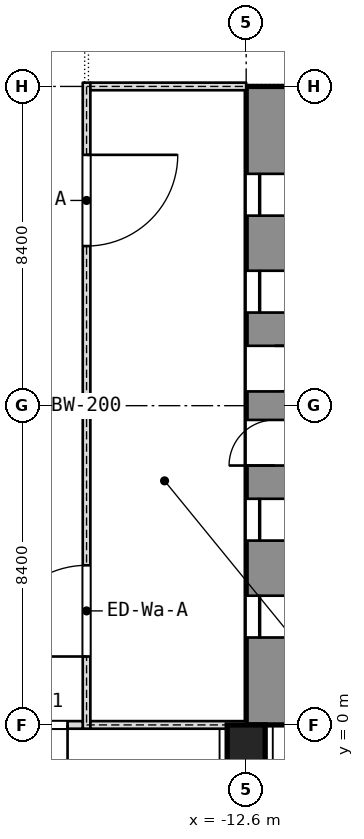
"""IFC4 building model, lengths in metres.
Left out: names, types, materials, properties, quantities, classifications, styles, units other than length and angle.
Written with IfcOpenShell. Run it as: python <this file> out.ifc"""

import sys

from ifc_helpers import new_model, si_unit, direction, frame, frame_2d, origin, origin_2d, place, context, subcontext, project, spatial, rectangle, extrude, element, fill, save


model = new_model("IFC4")
c1 = context("Model", 3, precision=1e-05, world=origin(), true_north=direction((0.0, 1.0)))
c2 = subcontext(c1, "Body", "Model", "MODEL_VIEW")
j1 = project(units=[si_unit("LENGTHUNIT", "METRE"), si_unit("PLANEANGLEUNIT", "RADIAN")], contexts=[c1])
p1 = place(None, origin())
s1 = spatial("IfcSite", under=j1, at=p1, CompositionType="ELEMENT")
p2 = place(p1, origin())
s2 = spatial("IfcBuilding", under=s1, at=p2, CompositionType="ELEMENT")
p3 = place(p2, frame((0.0, 0.0, 31.0)))
s3 = spatial("IfcBuildingStorey", under=s2, at=p3, CompositionType="ELEMENT", Elevation=31.0)
p4 = place(p3, frame((-11.85, 0.0, 0.0), z_axis=(0.0, 0.0, 1.0), x_axis=(0.0, 1.0, 0.0)))
e1 = element("IfcWall", 1, at=p4, inside=s3, PredefinedType="SHEAR", context=c2, shape_type="SweptSolid", body=[
    extrude(rectangle(XDim=16.8, YDim=1.5, at=frame_2d((8.4, 0.0))), origin(), (0.0, 0.0, 1.0), 5.5),
])
p5 = place(p4, frame((2.3, 0.0, 0.0)))
e2 = element("IfcOpeningElement", 2, at=p5, cuts=e1, PredefinedType="OPENING", context=c2, shape_type="SweptSolid", body=[
    extrude(rectangle(XDim=1.1, YDim=2.1, at=frame_2d((0.55, 1.05))), frame((0.0, 0.75, 0.0), z_axis=(0.0, -1.0, 0.0), x_axis=(1.0, 0.0, 0.0)), (0.0, 0.0, 1.0), 1.5),
])
p6 = place(p4, frame((4.85, 0.0, 0.0)))
e3 = element("IfcOpeningElement", 3, at=p6, cuts=e1, PredefinedType="OPENING", context=c2, shape_type="SweptSolid", body=[
    extrude(rectangle(XDim=1.1, YDim=2.1, at=frame_2d((0.55, 1.05))), frame((0.0, 0.75, 0.0), z_axis=(0.0, -1.0, 0.0), x_axis=(1.0, 0.0, 0.0)), (0.0, 0.0, 1.0), 1.5),
])
p7 = place(p4, frame((6.825, 0.0, 0.0)))
e4 = element("IfcOpeningElement", 4, at=p7, cuts=e1, PredefinedType="OPENING", context=c2, shape_type="SweptSolid", body=[
    extrude(rectangle(XDim=1.2, YDim=2.1, at=frame_2d((0.6, 1.05))), frame((0.0, 0.75, 0.0), z_axis=(0.0, -1.0, 0.0), x_axis=(1.0, 0.0, 0.0)), (0.0, 0.0, 1.0), 1.5),
])
p8 = place(p4, frame((13.4, 0.0, 0.0)))
e5 = element("IfcOpeningElement", 5, at=p8, cuts=e1, PredefinedType="OPENING", context=c2, shape_type="SweptSolid", body=[
    extrude(rectangle(XDim=1.1, YDim=2.1, at=frame_2d((0.55, 1.05))), frame((0.0, 0.75, 0.0), z_axis=(0.0, -1.0, 0.0), x_axis=(1.0, 0.0, 0.0)), (0.0, 0.0, 1.0), 1.5),
])
p9 = place(p4, frame((10.85, 0.0, 0.0)))
e6 = element("IfcOpeningElement", 6, at=p9, cuts=e1, PredefinedType="OPENING", context=c2, shape_type="SweptSolid", body=[
    extrude(rectangle(XDim=1.1, YDim=2.1, at=frame_2d((0.55, 1.05))), frame((0.0, 0.75, 0.0), z_axis=(0.0, -1.0, 0.0), x_axis=(1.0, 0.0, 0.0)), (0.0, 0.0, 1.0), 1.5),
])
p10 = place(p4, frame((8.775, 0.0, 0.0)))
e7 = element("IfcOpeningElement", 7, at=p10, cuts=e1, PredefinedType="OPENING", context=c2, shape_type="SweptSolid", body=[
    extrude(rectangle(XDim=1.2, YDim=2.1, at=frame_2d((0.6, 1.05))), frame((0.0, 0.75, 0.0), z_axis=(0.0, -1.0, 0.0), x_axis=(1.0, 0.0, 0.0)), (0.0, 0.0, 1.0), 1.5),
])
p11 = place(p3, frame((-12.6, -0.5, 0.0), z_axis=(0.0, 0.0, 1.0), x_axis=(1.0, 0.0, 0.0)))
e8 = element("IfcColumn", 8, at=p11, inside=s3, PredefinedType="COLUMN", context=c2, shape_type="SweptSolid", body=[
    extrude(rectangle(XDim=1.0, YDim=1.0, at=origin_2d()), origin(), (0.0, 0.0, 1.0), 5.5),
])
p12 = place(p3, frame((-16.8, -0.1, 0.0), z_axis=(0.0, 0.0, 1.0), x_axis=(0.0, 1.0, 0.0)))
e9 = element("IfcWall", 9, at=p12, inside=s3, PredefinedType="PARTITIONING", context=c2, shape_type="SweptSolid", body=[
    extrude(rectangle(XDim=17.0, YDim=0.2, at=frame_2d((8.5, 0.0))), origin(), (0.0, 0.0, 1.0), 4.95),
])
p13 = place(p12, frame((1.9, 0.0, 0.0)))
e10 = element("IfcOpeningElement", 10, at=p13, cuts=e9, PredefinedType="OPENING", context=c2, shape_type="SweptSolid", body=[
    extrude(rectangle(XDim=2.4, YDim=2.1, at=frame_2d((1.2, 1.05))), frame((0.0, 0.1, 0.0), z_axis=(0.0, -1.0, 0.0), x_axis=(1.0, 0.0, 0.0)), (0.0, 0.0, 1.0), 0.2),
])
p14 = place(p12, frame((12.7, 0.0, 0.0)))
e11 = element("IfcOpeningElement", 11, at=p14, cuts=e9, PredefinedType="OPENING", context=c2, shape_type="SweptSolid", body=[
    extrude(rectangle(XDim=2.4, YDim=2.1, at=frame_2d((1.2, 1.05))), frame((0.0, 0.1, 0.0), z_axis=(0.0, -1.0, 0.0), x_axis=(1.0, 0.0, 0.0)), (0.0, 0.0, 1.0), 0.2),
])
for number, where, z_axis, x_axis in (
    (12, (-16.7, 0.0, 0.0), (0.0, 0.0, 1.0), (1.0, 0.0, 0.0)),
    (13, (-16.7, 16.8, 0.0), (0.0, 0.0, 1.0), (1.0, 0.0, 0.0)),
):
    element("IfcWall", number, at=place(p3, frame(where, z_axis=z_axis, x_axis=x_axis)), inside=s3, PredefinedType="PARTITIONING", context=c2, shape_type="SweptSolid", body=[
        extrude(rectangle(XDim=4.1, YDim=0.2, at=frame_2d((2.05, 0.0))), origin(), (0.0, 0.0, 1.0), 4.85),
    ])
p15 = place(p3, frame((-20.099, 0.0, 0.0), z_axis=(0.0, 0.0, 1.0), x_axis=(1.0, 0.0, 0.0)))
e14 = element("IfcWall", 14, at=p15, inside=s3, PredefinedType="PARTITIONING", context=c2, shape_type="SweptSolid", body=[
    extrude(rectangle(XDim=3.198, YDim=0.2, at=frame_2d((1.599, 0.0))), origin(), (0.0, 0.0, 1.0), 4.85),
])
p16 = place(p15, frame((0.399, 0.0, 0.0)))
e15 = element("IfcOpeningElement", 15, at=p16, cuts=e14, PredefinedType="OPENING", context=c2, shape_type="SweptSolid", body=[
    extrude(rectangle(XDim=2.4, YDim=2.1, at=frame_2d((1.2, 1.05))), frame((0.0, 0.1, 0.0), z_axis=(0.0, -1.0, 0.0), x_axis=(1.0, 0.0, 0.0)), (0.0, 0.0, 1.0), 0.2),
])
p17 = place(p5, origin())
e16 = element("IfcDoor", 16, at=p17, inside=s3, OperationType="SLIDING_TO_LEFT", PredefinedType="DOOR", context=c2, shape_type="SweptSolid", body=[
    extrude(rectangle(XDim=1.1, YDim=2.1, at=frame_2d((0.55, 1.05))), frame((0.0, 0.025, 0.0), z_axis=(0.0, -1.0, 0.0), x_axis=(1.0, 0.0, 0.0)), (0.0, 0.0, 1.0), 0.05),
])
fill(e2, e16)
p18 = place(p6, origin())
e17 = element("IfcDoor", 17, at=p18, inside=s3, OperationType="SLIDING_TO_LEFT", PredefinedType="DOOR", context=c2, shape_type="SweptSolid", body=[
    extrude(rectangle(XDim=1.1, YDim=2.1, at=frame_2d((0.55, 1.05))), frame((0.0, 0.025, 0.0), z_axis=(0.0, -1.0, 0.0), x_axis=(1.0, 0.0, 0.0)), (0.0, 0.0, 1.0), 0.05),
])
fill(e3, e17)
p19 = place(p7, origin())
e18 = element("IfcDoor", 18, at=p19, inside=s3, OperationType="SINGLE_SWING_LEFT", PredefinedType="DOOR", context=c2, shape_type="SweptSolid", body=[
    extrude(rectangle(XDim=1.2, YDim=2.1, at=frame_2d((0.6, 1.05))), frame((0.0, 0.025, 0.0), z_axis=(0.0, -1.0, 0.0), x_axis=(1.0, 0.0, 0.0)), (0.0, 0.0, 1.0), 0.05),
])
fill(e4, e18)
p20 = place(p8, origin())
e19 = element("IfcDoor", 19, at=p20, inside=s3, OperationType="SLIDING_TO_LEFT", PredefinedType="DOOR", context=c2, shape_type="SweptSolid", body=[
    extrude(rectangle(XDim=1.1, YDim=2.1, at=frame_2d((0.55, 1.05))), frame((0.0, 0.025, 0.0), z_axis=(0.0, -1.0, 0.0), x_axis=(1.0, 0.0, 0.0)), (0.0, 0.0, 1.0), 0.05),
])
fill(e5, e19)
p21 = place(p9, origin())
e20 = element("IfcDoor", 20, at=p21, inside=s3, OperationType="SLIDING_TO_LEFT", PredefinedType="DOOR", context=c2, shape_type="SweptSolid", body=[
    extrude(rectangle(XDim=1.1, YDim=2.1, at=frame_2d((0.55, 1.05))), frame((0.0, 0.025, 0.0), z_axis=(0.0, -1.0, 0.0), x_axis=(1.0, 0.0, 0.0)), (0.0, 0.0, 1.0), 0.05),
])
fill(e6, e20)
p22 = place(p10, origin())
e21 = element("IfcDoor", 21, at=p22, inside=s3, OperationType="SINGLE_SWING_LEFT", PredefinedType="DOOR", context=c2, shape_type="SweptSolid", body=[
    extrude(rectangle(XDim=1.2, YDim=2.1, at=frame_2d((0.6, 1.05))), frame((0.0, 0.025, 0.0), z_axis=(0.0, -1.0, 0.0), x_axis=(1.0, 0.0, 0.0)), (0.0, 0.0, 1.0), 0.05),
])
fill(e7, e21)
p23 = place(p13, origin())
e22 = element("IfcDoor", 22, at=p23, inside=s3, OperationType="DOUBLE_DOOR_SINGLE_SWING", PredefinedType="DOOR", context=c2, shape_type="SweptSolid", body=[
    extrude(rectangle(XDim=2.4, YDim=2.1, at=frame_2d((1.2, 1.05))), frame((0.0, 0.025, 0.0), z_axis=(0.0, -1.0, 0.0), x_axis=(1.0, 0.0, 0.0)), (0.0, 0.0, 1.0), 0.05),
])
fill(e10, e22)
p24 = place(p14, origin())
e23 = element("IfcDoor", 23, at=p24, inside=s3, OperationType="DOUBLE_DOOR_SINGLE_SWING", PredefinedType="DOOR", context=c2, shape_type="SweptSolid", body=[
    extrude(rectangle(XDim=2.4, YDim=2.1, at=frame_2d((1.2, 1.05))), frame((0.0, 0.025, 0.0), z_axis=(0.0, -1.0, 0.0), x_axis=(1.0, 0.0, 0.0)), (0.0, 0.0, 1.0), 0.05),
])
fill(e11, e23)
p25 = place(p16, origin())
e24 = element("IfcDoor", 24, at=p25, inside=s3, OperationType="DOUBLE_DOOR_DOUBLE_SWING", PredefinedType="DOOR", context=c2, shape_type="SweptSolid", body=[
    extrude(rectangle(XDim=2.4, YDim=2.1, at=frame_2d((1.2, 1.05))), frame((0.0, 0.025, 0.0), z_axis=(0.0, -1.0, 0.0), x_axis=(1.0, 0.0, 0.0)), (0.0, 0.0, 1.0), 0.05),
])
fill(e15, e24)
save(model, sys.argv[1])
